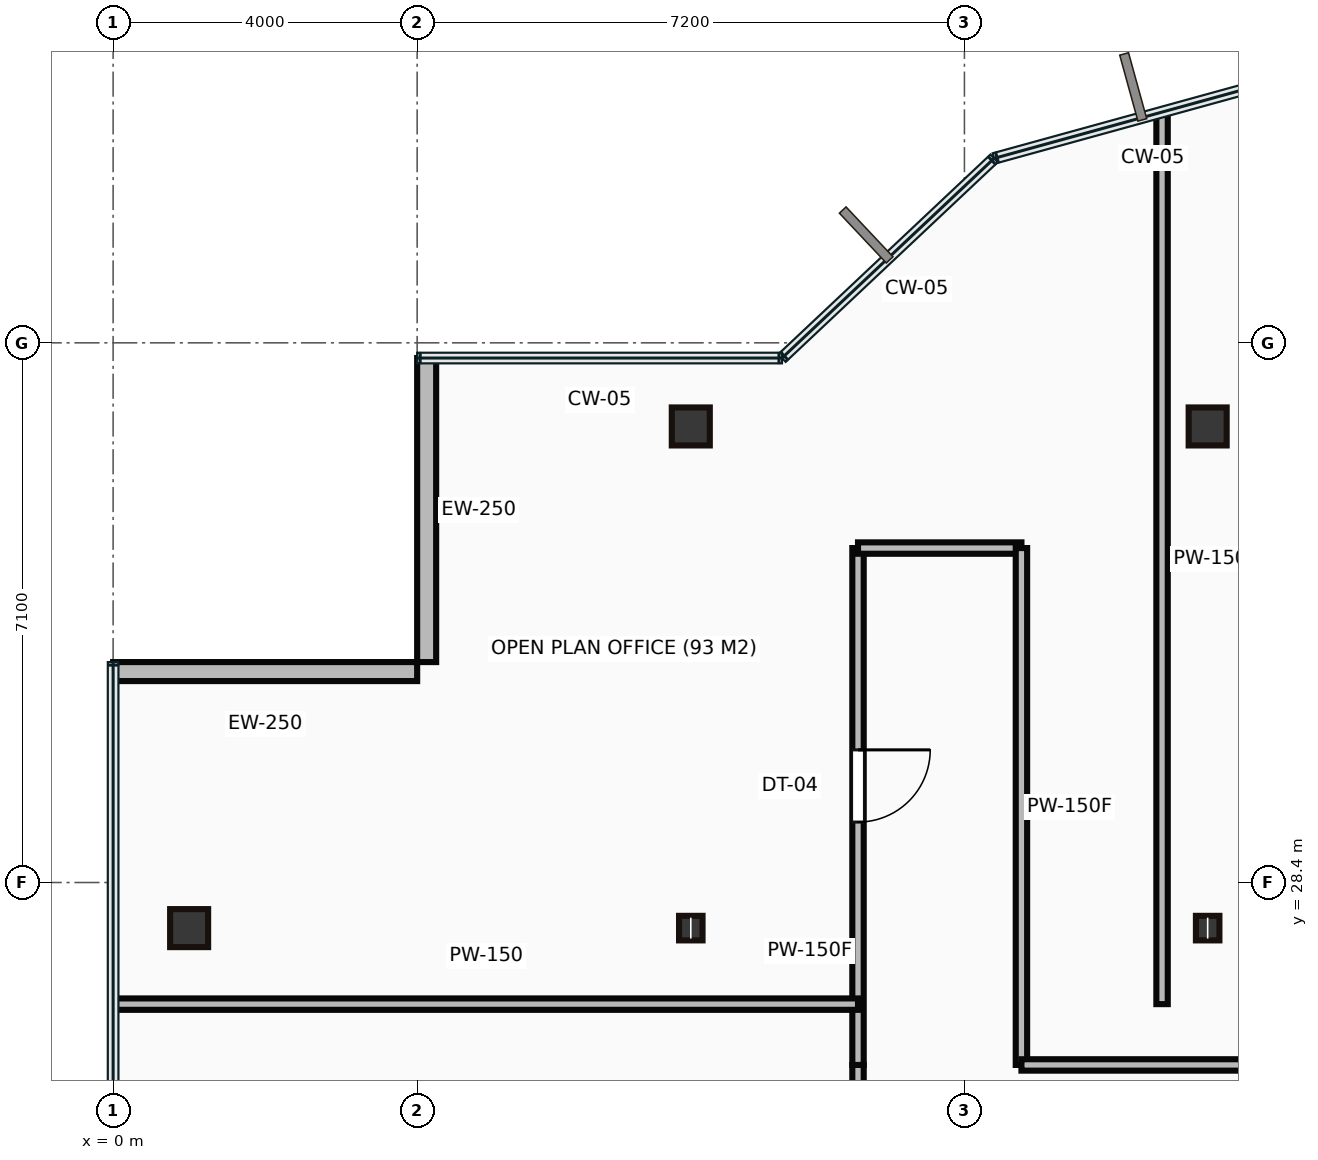
"""IFC4 building model, lengths in metres.
Left out: names, types, materials, properties, quantities, classifications, styles, units other than length and angle.
Written with IfcOpenShell. Run it as: python <this file> out.ifc"""

import sys

from ifc_helpers import new_model, si_unit, direction, frame, frame_2d, origin, origin_2d, place, context, subcontext, project, spatial, rectangle, hollow_rectangle, i_section, extrude, source, transform, mapped, element, fill, save


model = new_model("IFC4")
c1 = context("Model", 3, precision=1e-05, world=origin(), true_north=direction((0.0, 1.0)))
c2 = subcontext(c1, "Body", "Model", "MODEL_VIEW")
j1 = project(units=[si_unit("LENGTHUNIT", "METRE"), si_unit("PLANEANGLEUNIT", "RADIAN")], contexts=[c1])
p1 = place(None, origin())
s1 = spatial("IfcSite", under=j1, at=p1, CompositionType="ELEMENT")
p2 = place(p1, origin())
s2 = spatial("IfcBuilding", under=s1, at=p2, CompositionType="ELEMENT")
p3 = place(p2, frame((0.0, 0.0, 244.2)))
s3 = spatial("IfcBuildingStorey", under=s2, at=p3, CompositionType="ELEMENT", Elevation=244.2)
m1 = source(origin(), c2, "Body", "SweptSolid", [
    extrude(hollow_rectangle(XDim=0.5, YDim=0.5, WallThickness=0.022, at=origin_2d()), origin(), (0.0, 0.0, 1.0), 3.65),
])
p4 = place(p3, frame((1.0, 27.8, 0.0), z_axis=(0.0, 0.0, 1.0), x_axis=(1.0, 0.0, 0.0)))
e1 = element("IfcColumn", 1, at=p4, inside=s3, PredefinedType="COLUMN", context=c2, shape_type="MappedRepresentation", body=[
    mapped(m1, transform((0.0, 0.0, 0.0))),
])
m2 = source(origin(), c2, "Body", "SweptSolid", [
    extrude(i_section(OverallWidth=0.309, OverallDepth=0.323, WebThickness=0.014, FlangeThickness=0.023, at=origin_2d()), origin(), (0.0, 0.0, 1.0), 3.65),
])
p5 = place(p3, frame((7.6, 27.8, 0.0), z_axis=(0.0, 0.0, 1.0), x_axis=(1.0, 0.0, 0.0)))
e2 = element("IfcColumn", 2, at=p5, inside=s3, PredefinedType="COLUMN", context=c2, shape_type="MappedRepresentation", body=[
    mapped(m2, transform((0.0, 0.0, 0.0))),
])
p6 = place(p3, frame((7.6, 34.4, 0.0), z_axis=(0.0, 0.0, 1.0), x_axis=(1.0, 0.0, 0.0)))
e3 = element("IfcColumn", 3, at=p6, inside=s3, PredefinedType="COLUMN", context=c2, shape_type="MappedRepresentation", body=[
    mapped(m1, transform((0.0, 0.0, 0.0))),
])
p7 = place(p3, frame((14.4, 27.8, 0.0), z_axis=(0.0, 0.0, 1.0), x_axis=(1.0, 0.0, 0.0)))
e4 = element("IfcColumn", 4, at=p7, inside=s3, PredefinedType="COLUMN", context=c2, shape_type="MappedRepresentation", body=[
    mapped(m2, transform((0.0, 0.0, 0.0))),
])
p8 = place(p3, frame((14.4, 34.4, 0.0), z_axis=(0.0, 0.0, 1.0), x_axis=(1.0, 0.0, 0.0)))
e5 = element("IfcColumn", 5, at=p8, inside=s3, PredefinedType="COLUMN", context=c2, shape_type="MappedRepresentation", body=[
    mapped(m1, transform((0.0, 0.0, 0.0))),
])
m3 = source(origin(), c2, "Body", "SweptSolid", [
    extrude(rectangle(XDim=4.0, YDim=0.25, at=frame_2d((2.0, 0.0))), origin(), (0.0, 0.0, 1.0), 3.4),
])
for number, where, z_axis, x_axis in (
    (6, (4.125, 35.3, 0.0), (0.0, 0.0, 1.0), (0.0, -1.0, 0.0)),
    (7, (4.0, 31.175, 0.0), (0.0, 0.0, 1.0), (-1.0, 0.0, 0.0)),
):
    element("IfcWall", number, at=place(p3, frame(where, z_axis=z_axis, x_axis=x_axis)), inside=s3, PredefinedType="STANDARD", context=c2, shape_type="MappedRepresentation", body=[
        mapped(m3, transform((0.0, 0.0, 0.0))),
    ])
m4 = source(origin(), c2, "Body", "SweptSolid", [
    extrude(rectangle(XDim=2.0, YDim=0.15, at=frame_2d((1.0, 0.0))), origin(), (0.0, 0.0, 1.0), 3.4),
])
p9 = place(p3, frame((9.8, 24.0, 0.0), z_axis=(0.0, 0.0, 1.0), x_axis=(0.0, 1.0, 0.0)))
e8 = element("IfcWall", 8, at=p9, inside=s3, PredefinedType="PARTITIONING", context=c2, shape_type="MappedRepresentation", body=[
    mapped(m4, transform((0.0, 0.0, 0.0))),
])
m5 = source(origin(), c2, "Body", "SweptSolid", [
    extrude(rectangle(XDim=6.8, YDim=0.15, at=frame_2d((3.4, 0.0))), origin(), (0.0, 0.0, 1.0), 3.4),
])
p10 = place(p3, frame((9.8, 26.0, 0.0), z_axis=(0.0, 0.0, 1.0), x_axis=(0.0, 1.0, 0.0)))
e9 = element("IfcWall", 9, at=p10, inside=s3, PredefinedType="PARTITIONING", context=c2, shape_type="MappedRepresentation", body=[
    mapped(m5, transform((0.0, 0.0, 0.0))),
])
p11 = place(p10, frame((3.195, 0.0, 0.0)))
e10 = element("IfcOpeningElement", 10, at=p11, cuts=e9, PredefinedType="OPENING", context=c2, shape_type="SweptSolid", body=[
    extrude(rectangle(XDim=0.95, YDim=2.15, at=frame_2d((0.475, 1.075))), frame((0.0, 0.085, 0.0), z_axis=(0.0, -1.0, 0.0), x_axis=(1.0, 0.0, 0.0)), (0.0, 0.0, 1.0), 0.17),
])
m6 = source(origin(), c2, "Body", "SweptSolid", [
    extrude(rectangle(XDim=2.15, YDim=0.15, at=frame_2d((1.075, 0.0))), origin(), (0.0, 0.0, 1.0), 3.4),
])
p12 = place(p3, frame((9.8, 32.8, 0.0), z_axis=(0.0, 0.0, 1.0), x_axis=(1.0, 0.0, 0.0)))
e11 = element("IfcWall", 11, at=p12, inside=s3, PredefinedType="PARTITIONING", context=c2, shape_type="MappedRepresentation", body=[
    mapped(m6, transform((0.0, 0.0, 0.0))),
])
p13 = place(p3, frame((11.95, 32.8, 0.0), z_axis=(0.0, 0.0, 1.0), x_axis=(0.0, -1.0, 0.0)))
e12 = element("IfcWall", 12, at=p13, inside=s3, PredefinedType="PARTITIONING", context=c2, shape_type="MappedRepresentation", body=[
    mapped(m5, transform((0.0, 0.0, 0.0))),
])
m7 = source(origin(), c2, "Body", "SweptSolid", [
    extrude(rectangle(XDim=23.65, YDim=0.15, at=frame_2d((11.825, 0.0))), origin(), (0.0, 0.0, 1.0), 3.4),
])
p14 = place(p3, frame((11.95, 26.0, 0.0), z_axis=(0.0, 0.0, 1.0), x_axis=(1.0, 0.0, 0.0)))
e13 = element("IfcWall", 13, at=p14, inside=s3, PredefinedType="PARTITIONING", context=c2, shape_type="MappedRepresentation", body=[
    mapped(m7, transform((0.0, 0.0, 0.0))),
])
p15 = place(p14, frame((12.145, 0.0, 0.0)))
e14 = element("IfcOpeningElement", 14, at=p15, cuts=e13, PredefinedType="OPENING", context=c2, shape_type="SweptSolid", body=[
    extrude(rectangle(XDim=0.95, YDim=2.15, at=frame_2d((0.475, 1.075))), frame((0.0, 0.085, 0.0), z_axis=(0.0, -1.0, 0.0), x_axis=(1.0, 0.0, 0.0)), (0.0, 0.0, 1.0), 0.17),
])
m8 = source(origin(), c2, "Body", "SweptSolid", [
    extrude(rectangle(XDim=9.78, YDim=0.15, at=frame_2d((4.89, 0.0))), origin(), (0.0, 0.0, 1.0), 3.4),
])
p16 = place(p3, frame((0.02, 26.8, 0.0), z_axis=(0.0, 0.0, 1.0), x_axis=(1.0, 0.0, 0.0)))
e15 = element("IfcWall", 15, at=p16, inside=s3, PredefinedType="PARTITIONING", context=c2, shape_type="MappedRepresentation", body=[
    mapped(m8, transform((0.0, 0.0, 0.0))),
])
m9 = source(origin(), c2, "Body", "SweptSolid", [
    extrude(rectangle(XDim=11.715, YDim=0.15, at=frame_2d((5.857, 0.0))), origin(), (0.0, 0.0, 1.0), 3.4),
])
p17 = place(p3, frame((13.8, 38.515, 0.0), z_axis=(0.0, 0.0, 1.0), x_axis=(0.0, -1.0, 0.0)))
e16 = element("IfcWall", 16, at=p17, inside=s3, PredefinedType="PARTITIONING", context=c2, shape_type="MappedRepresentation", body=[
    mapped(m9, transform((0.0, 0.0, 0.0))),
])
m10 = source(origin(), c2, "Body", "SweptSolid", [
    extrude(rectangle(XDim=0.95, YDim=2.15, at=frame_2d((0.475, 1.075))), frame((0.0, 0.025, 0.0), z_axis=(0.0, -1.0, 0.0), x_axis=(1.0, 0.0, 0.0)), (0.0, 0.0, 1.0), 0.05),
])
p18 = place(p11, origin())
e17 = element("IfcDoor", 17, at=p18, inside=s3, OperationType="SINGLE_SWING_RIGHT", PredefinedType="DOOR", context=c2, shape_type="MappedRepresentation", body=[
    mapped(m10, transform((0.0, 0.0, 0.0))),
])
fill(e10, e17)
save(model, sys.argv[1])
